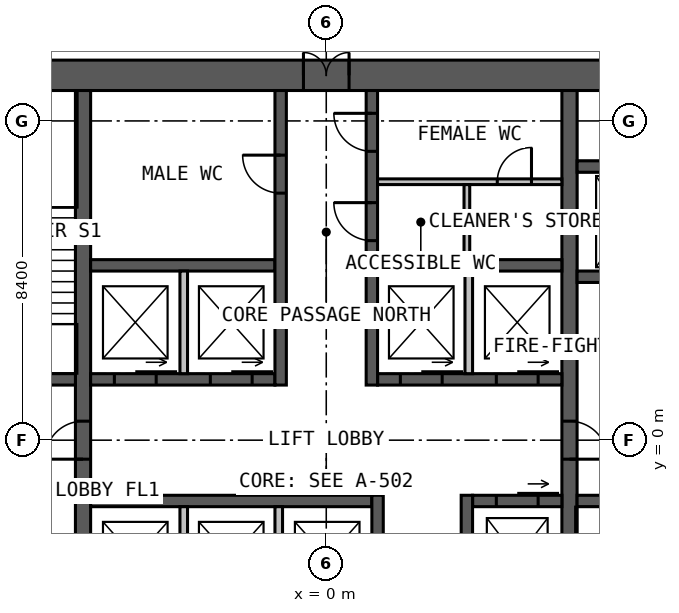
"""IFC4 building model, lengths in metres.
Left out: names, types, materials, properties, quantities, classifications, styles, units other than length and angle.
Written with IfcOpenShell. Run it as: python <this file> out.ifc"""

import sys

from ifc_helpers import new_model, si_unit, direction, frame, frame_2d, origin, place, context, subcontext, project, spatial, rectangle, extrude, element, fill, save


model = new_model("IFC4")
c1 = context("Model", 3, precision=1e-05, world=origin(), true_north=direction((0.0, 1.0)))
c2 = subcontext(c1, "Body", "Model", "MODEL_VIEW")
j1 = project(units=[si_unit("LENGTHUNIT", "METRE"), si_unit("PLANEANGLEUNIT", "RADIAN")], contexts=[c1])
p1 = place(None, origin())
s1 = spatial("IfcSite", under=j1, at=p1, CompositionType="ELEMENT")
p2 = place(p1, origin())
s2 = spatial("IfcBuilding", under=s1, at=p2, CompositionType="ELEMENT")
p3 = place(p2, frame((0.0, 0.0, 73.0)))
s3 = spatial("IfcBuildingStorey", under=s2, at=p3, CompositionType="ELEMENT", Elevation=73.0)
p4 = place(p3, frame((-10.0, 9.6, 0.0), z_axis=(0.0, 0.0, 1.0), x_axis=(1.0, 0.0, 0.0)))
e1 = element("IfcWall", 1, at=p4, inside=s3, PredefinedType="SOLIDWALL", context=c2, shape_type="SweptSolid", body=[
    extrude(rectangle(XDim=20.0, YDim=0.8, at=frame_2d((10.0, 0.0))), origin(), (0.0, 0.0, 1.0), 4.0),
])
p5 = place(p4, frame((9.4, 0.0, 0.0)))
e2 = element("IfcOpeningElement", 2, at=p5, cuts=e1, PredefinedType="OPENING", context=c2, shape_type="SweptSolid", body=[
    extrude(rectangle(XDim=1.2, YDim=2.2, at=frame_2d((0.6, 1.1))), frame((0.0, 0.41, 0.0), z_axis=(0.0, -1.0, 0.0), x_axis=(1.0, 0.0, 0.0)), (0.0, 0.0, 1.0), 0.82),
])
p6 = place(p3, frame((-6.4, -9.2, 0.0), z_axis=(0.0, 0.0, 1.0), x_axis=(0.0, 1.0, 0.0)))
e3 = element("IfcWall", 3, at=p6, inside=s3, PredefinedType="SOLIDWALL", context=c2, shape_type="SweptSolid", body=[
    extrude(rectangle(XDim=18.4, YDim=0.4, at=frame_2d((9.2, 0.0))), origin(), (0.0, 0.0, 1.0), 4.0),
])
p7 = place(p6, frame((8.7, 0.0, 0.0)))
e4 = element("IfcOpeningElement", 4, at=p7, cuts=e3, PredefinedType="OPENING", context=c2, shape_type="SweptSolid", body=[
    extrude(rectangle(XDim=1.0, YDim=2.2, at=frame_2d((0.5, 1.1))), frame((0.0, 0.21, 0.0), z_axis=(0.0, -1.0, 0.0), x_axis=(1.0, 0.0, 0.0)), (0.0, 0.0, 1.0), 0.42),
])
p8 = place(p3, frame((6.4, 9.2, 0.0), z_axis=(0.0, 0.0, 1.0), x_axis=(0.0, -1.0, 0.0)))
e5 = element("IfcWall", 5, at=p8, inside=s3, PredefinedType="SOLIDWALL", context=c2, shape_type="SweptSolid", body=[
    extrude(rectangle(XDim=18.4, YDim=0.4, at=frame_2d((9.2, 0.0))), origin(), (0.0, 0.0, 1.0), 4.0),
])
p9 = place(p8, frame((8.7, 0.0, 0.0)))
e6 = element("IfcOpeningElement", 6, at=p9, cuts=e5, PredefinedType="OPENING", context=c2, shape_type="SweptSolid", body=[
    extrude(rectangle(XDim=1.0, YDim=2.2, at=frame_2d((0.5, 1.1))), frame((0.0, 0.21, 0.0), z_axis=(0.0, -1.0, 0.0), x_axis=(1.0, 0.0, 0.0)), (0.0, 0.0, 1.0), 0.42),
])
p10 = place(p3, frame((-6.2, 1.6, 0.0), z_axis=(0.0, 0.0, 1.0), x_axis=(1.0, 0.0, 0.0)))
e7 = element("IfcWall", 7, at=p10, inside=s3, PredefinedType="SOLIDWALL", context=c2, shape_type="SweptSolid", body=[
    extrude(rectangle(XDim=4.85, YDim=0.3, at=frame_2d((2.425, 0.0))), origin(), (0.0, 0.0, 1.0), 4.0),
])
p11 = place(p10, frame((0.625, 0.0, 0.0)))
e8 = element("IfcOpeningElement", 8, at=p11, cuts=e7, PredefinedType="OPENING", context=c2, shape_type="SweptSolid", body=[
    extrude(rectangle(XDim=1.1, YDim=2.2, at=frame_2d((0.55, 1.1))), frame((0.0, 0.16, 0.0), z_axis=(0.0, -1.0, 0.0), x_axis=(1.0, 0.0, 0.0)), (0.0, 0.0, 1.0), 0.32),
])
p12 = place(p10, frame((3.15, 0.0, 0.0)))
e9 = element("IfcOpeningElement", 9, at=p12, cuts=e7, PredefinedType="OPENING", context=c2, shape_type="SweptSolid", body=[
    extrude(rectangle(XDim=1.1, YDim=2.2, at=frame_2d((0.55, 1.1))), frame((0.0, 0.16, 0.0), z_axis=(0.0, -1.0, 0.0), x_axis=(1.0, 0.0, 0.0)), (0.0, 0.0, 1.0), 0.32),
])
p13 = place(p3, frame((1.35, 1.6, 0.0), z_axis=(0.0, 0.0, 1.0), x_axis=(1.0, 0.0, 0.0)))
e10 = element("IfcWall", 10, at=p13, inside=s3, PredefinedType="SOLIDWALL", context=c2, shape_type="SweptSolid", body=[
    extrude(rectangle(XDim=4.85, YDim=0.3, at=frame_2d((2.425, 0.0))), origin(), (0.0, 0.0, 1.0), 4.0),
])
p14 = place(p13, frame((0.6, 0.0, 0.0)))
e11 = element("IfcOpeningElement", 11, at=p14, cuts=e10, PredefinedType="OPENING", context=c2, shape_type="SweptSolid", body=[
    extrude(rectangle(XDim=1.1, YDim=2.2, at=frame_2d((0.55, 1.1))), frame((0.0, 0.16, 0.0), z_axis=(0.0, -1.0, 0.0), x_axis=(1.0, 0.0, 0.0)), (0.0, 0.0, 1.0), 0.32),
])
p15 = place(p13, frame((3.125, 0.0, 0.0)))
e12 = element("IfcOpeningElement", 12, at=p15, cuts=e10, PredefinedType="OPENING", context=c2, shape_type="SweptSolid", body=[
    extrude(rectangle(XDim=1.1, YDim=2.2, at=frame_2d((0.55, 1.1))), frame((0.0, 0.16, 0.0), z_axis=(0.0, -1.0, 0.0), x_axis=(1.0, 0.0, 0.0)), (0.0, 0.0, 1.0), 0.32),
])
for number, where, z_axis, x_axis in (
    (13, (-6.2, 4.6, 0.0), (0.0, 0.0, 1.0), (1.0, 0.0, 0.0)),
    (14, (1.35, 4.6, 0.0), (0.0, 0.0, 1.0), (1.0, 0.0, 0.0)),
):
    element("IfcWall", number, at=place(p3, frame(where, z_axis=z_axis, x_axis=x_axis)), inside=s3, PredefinedType="SOLIDWALL", context=c2, shape_type="SweptSolid", body=[
        extrude(rectangle(XDim=4.85, YDim=0.3, at=frame_2d((2.425, 0.0))), origin(), (0.0, 0.0, 1.0), 4.0),
    ])
p16 = place(p3, frame((-1.2, 1.45, 0.0), z_axis=(0.0, 0.0, 1.0), x_axis=(0.0, 1.0, 0.0)))
e15 = element("IfcWall", 15, at=p16, inside=s3, PredefinedType="SOLIDWALL", context=c2, shape_type="SweptSolid", body=[
    extrude(rectangle(XDim=7.75, YDim=0.3, at=frame_2d((3.875, 0.0))), origin(), (0.0, 0.0, 1.0), 4.0),
])
p17 = place(p16, frame((5.05, 0.0, 0.0)))
e16 = element("IfcOpeningElement", 16, at=p17, cuts=e15, PredefinedType="OPENING", context=c2, shape_type="SweptSolid", body=[
    extrude(rectangle(XDim=1.0, YDim=2.2, at=frame_2d((0.5, 1.1))), frame((0.0, 0.16, 0.0), z_axis=(0.0, -1.0, 0.0), x_axis=(1.0, 0.0, 0.0)), (0.0, 0.0, 1.0), 0.32),
])
p18 = place(p3, frame((1.2, 1.45, 0.0), z_axis=(0.0, 0.0, 1.0), x_axis=(0.0, 1.0, 0.0)))
e17 = element("IfcWall", 17, at=p18, inside=s3, PredefinedType="SOLIDWALL", context=c2, shape_type="SweptSolid", body=[
    extrude(rectangle(XDim=7.75, YDim=0.3, at=frame_2d((3.875, 0.0))), origin(), (0.0, 0.0, 1.0), 4.0),
])
p19 = place(p18, frame((3.8, 0.0, 0.0)))
e18 = element("IfcOpeningElement", 18, at=p19, cuts=e17, PredefinedType="OPENING", context=c2, shape_type="SweptSolid", body=[
    extrude(rectangle(XDim=1.0, YDim=2.2, at=frame_2d((0.5, 1.1))), frame((0.0, 0.16, 0.0), z_axis=(0.0, -1.0, 0.0), x_axis=(1.0, 0.0, 0.0)), (0.0, 0.0, 1.0), 0.32),
])
p20 = place(p18, frame((6.15, 0.0, 0.0)))
e19 = element("IfcOpeningElement", 19, at=p20, cuts=e17, PredefinedType="OPENING", context=c2, shape_type="SweptSolid", body=[
    extrude(rectangle(XDim=1.0, YDim=2.2, at=frame_2d((0.5, 1.1))), frame((0.0, 0.16, 0.0), z_axis=(0.0, -1.0, 0.0), x_axis=(1.0, 0.0, 0.0)), (0.0, 0.0, 1.0), 0.32),
])
p21 = place(p3, frame((-6.2, -1.6, 0.0), z_axis=(0.0, 0.0, 1.0), x_axis=(1.0, 0.0, 0.0)))
e20 = element("IfcWall", 20, at=p21, inside=s3, PredefinedType="SOLIDWALL", context=c2, shape_type="SweptSolid", body=[
    extrude(rectangle(XDim=7.4, YDim=0.3, at=frame_2d((3.7, 0.0))), origin(), (0.0, 0.0, 1.0), 4.0),
])
p22 = place(p3, frame((3.85, -1.6, 0.0), z_axis=(0.0, 0.0, 1.0), x_axis=(1.0, 0.0, 0.0)))
e21 = element("IfcWall", 21, at=p22, inside=s3, PredefinedType="SOLIDWALL", context=c2, shape_type="SweptSolid", body=[
    extrude(rectangle(XDim=2.35, YDim=0.3, at=frame_2d((1.175, 0.0))), origin(), (0.0, 0.0, 1.0), 4.0),
])
p23 = place(p22, frame((0.625, 0.0, 0.0)))
e22 = element("IfcOpeningElement", 22, at=p23, cuts=e21, PredefinedType="OPENING", context=c2, shape_type="SweptSolid", body=[
    extrude(rectangle(XDim=1.1, YDim=2.2, at=frame_2d((0.55, 1.1))), frame((0.0, 0.16, 0.0), z_axis=(0.0, -1.0, 0.0), x_axis=(1.0, 0.0, 0.0)), (0.0, 0.0, 1.0), 0.32),
])
p24 = place(p3, frame((1.35, -1.45, 0.0), z_axis=(0.0, 0.0, 1.0), x_axis=(0.0, -1.0, 0.0)))
e23 = element("IfcWall", 23, at=p24, inside=s3, PredefinedType="SOLIDWALL", context=c2, shape_type="SweptSolid", body=[
    extrude(rectangle(XDim=7.75, YDim=0.3, at=frame_2d((3.875, 0.0))), origin(), (0.0, 0.0, 1.0), 4.0),
])
p25 = place(p24, frame((5.8, 0.0, 0.0)))
e24 = element("IfcOpeningElement", 24, at=p25, cuts=e23, PredefinedType="OPENING", context=c2, shape_type="SweptSolid", body=[
    extrude(rectangle(XDim=1.0, YDim=2.2, at=frame_2d((0.5, 1.1))), frame((0.0, 0.16, 0.0), z_axis=(0.0, -1.0, 0.0), x_axis=(1.0, 0.0, 0.0)), (0.0, 0.0, 1.0), 0.32),
])
p26 = place(p24, frame((3.525, 0.0, 0.0)))
e25 = element("IfcOpeningElement", 25, at=p26, cuts=e23, PredefinedType="OPENING", context=c2, shape_type="SweptSolid", body=[
    extrude(rectangle(XDim=0.9, YDim=2.2, at=frame_2d((0.45, 1.1))), frame((0.0, 0.16, 0.0), z_axis=(0.0, -1.0, 0.0), x_axis=(1.0, 0.0, 0.0)), (0.0, 0.0, 1.0), 0.32),
])
p27 = place(p3, frame((3.7, -1.45, 0.0), z_axis=(0.0, 0.0, 1.0), x_axis=(0.0, -1.0, 0.0)))
e26 = element("IfcWall", 26, at=p27, inside=s3, PredefinedType="SOLIDWALL", context=c2, shape_type="SweptSolid", body=[
    extrude(rectangle(XDim=7.75, YDim=0.3, at=frame_2d((3.875, 0.0))), origin(), (0.0, 0.0, 1.0), 4.0),
])
p28 = place(p27, frame((5.1, 0.0, 0.0)))
e27 = element("IfcOpeningElement", 27, at=p28, cuts=e26, PredefinedType="OPENING", context=c2, shape_type="SweptSolid", body=[
    extrude(rectangle(XDim=0.9, YDim=2.2, at=frame_2d((0.45, 1.1))), frame((0.0, 0.16, 0.0), z_axis=(0.0, -1.0, 0.0), x_axis=(1.0, 0.0, 0.0)), (0.0, 0.0, 1.0), 0.32),
])
p29 = place(p3, frame((-9.2, 1.6, 0.0), z_axis=(0.0, 0.0, 1.0), x_axis=(1.0, 0.0, 0.0)))
e28 = element("IfcWall", 28, at=p29, inside=s3, PredefinedType="SOLIDWALL", context=c2, shape_type="SweptSolid", body=[
    extrude(rectangle(XDim=2.6, YDim=0.3, at=frame_2d((1.3, 0.0))), origin(), (0.0, 0.0, 1.0), 4.0),
])
p30 = place(p29, frame((0.8, 0.0, 0.0)))
e29 = element("IfcOpeningElement", 29, at=p30, cuts=e28, PredefinedType="OPENING", context=c2, shape_type="SweptSolid", body=[
    extrude(rectangle(XDim=1.0, YDim=2.2, at=frame_2d((0.5, 1.1))), frame((0.0, 0.16, 0.0), z_axis=(0.0, -1.0, 0.0), x_axis=(1.0, 0.0, 0.0)), (0.0, 0.0, 1.0), 0.32),
])
p31 = place(p3, frame((6.6, -1.6, 0.0), z_axis=(0.0, 0.0, 1.0), x_axis=(1.0, 0.0, 0.0)))
e30 = element("IfcWall", 30, at=p31, inside=s3, PredefinedType="SOLIDWALL", context=c2, shape_type="SweptSolid", body=[
    extrude(rectangle(XDim=2.6, YDim=0.3, at=frame_2d((1.3, 0.0))), origin(), (0.0, 0.0, 1.0), 4.0),
])
p32 = place(p31, frame((0.8, 0.0, 0.0)))
e31 = element("IfcOpeningElement", 31, at=p32, cuts=e30, PredefinedType="OPENING", context=c2, shape_type="SweptSolid", body=[
    extrude(rectangle(XDim=1.0, YDim=2.2, at=frame_2d((0.5, 1.1))), frame((0.0, 0.16, 0.0), z_axis=(0.0, -1.0, 0.0), x_axis=(1.0, 0.0, 0.0)), (0.0, 0.0, 1.0), 0.32),
])
p33 = place(p3, frame((6.6, 4.3, 0.0), z_axis=(0.0, 0.0, 1.0), x_axis=(1.0, 0.0, 0.0)))
e32 = element("IfcWall", 32, at=p33, inside=s3, PredefinedType="SOLIDWALL", context=c2, shape_type="SweptSolid", body=[
    extrude(rectangle(XDim=2.6, YDim=0.3, at=frame_2d((1.3, 0.0))), origin(), (0.0, 0.0, 1.0), 4.0),
])
p34 = place(p33, frame((0.75, 0.0, 0.0)))
e33 = element("IfcOpeningElement", 33, at=p34, cuts=e32, PredefinedType="OPENING", context=c2, shape_type="SweptSolid", body=[
    extrude(rectangle(XDim=1.1, YDim=2.2, at=frame_2d((0.55, 1.1))), frame((0.0, 0.16, 0.0), z_axis=(0.0, -1.0, 0.0), x_axis=(1.0, 0.0, 0.0)), (0.0, 0.0, 1.0), 0.32),
])
p35 = place(p3, frame((6.6, 7.2, 0.0), z_axis=(0.0, 0.0, 1.0), x_axis=(1.0, 0.0, 0.0)))
e34 = element("IfcWall", 34, at=p35, inside=s3, PredefinedType="SOLIDWALL", context=c2, shape_type="SweptSolid", body=[
    extrude(rectangle(XDim=2.6, YDim=0.3, at=frame_2d((1.3, 0.0))), origin(), (0.0, 0.0, 1.0), 4.0),
])
for number, where, z_axis, x_axis in (
    (35, (-3.75, 1.75, 0.0), (0.0, 0.0, 1.0), (0.0, 1.0, 0.0)),
    (36, (3.75, 1.75, 0.0), (0.0, 0.0, 1.0), (0.0, 1.0, 0.0)),
    (37, (-3.75, -1.75, 0.0), (0.0, 0.0, 1.0), (0.0, -1.0, 0.0)),
    (38, (-1.25, -1.75, 0.0), (0.0, 0.0, 1.0), (0.0, -1.0, 0.0)),
):
    element("IfcWall", number, at=place(p3, frame(where, z_axis=z_axis, x_axis=x_axis)), inside=s3, PredefinedType="SOLIDWALL", context=c2, shape_type="SweptSolid", body=[
        extrude(rectangle(XDim=2.7, YDim=0.2, at=frame_2d((1.35, 0.0))), origin(), (0.0, 0.0, 1.0), 3.75),
    ])
p36 = place(p3, frame((1.35, 6.8, 0.0), z_axis=(0.0, 0.0, 1.0), x_axis=(1.0, 0.0, 0.0)))
e39 = element("IfcWall", 39, at=p36, inside=s3, PredefinedType="PARTITIONING", context=c2, shape_type="SweptSolid", body=[
    extrude(rectangle(XDim=4.85, YDim=0.15, at=frame_2d((2.425, 0.0))), origin(), (0.0, 0.0, 1.0), 3.75),
])
p37 = place(p36, frame((3.15, 0.0, 0.0)))
e40 = element("IfcOpeningElement", 40, at=p37, cuts=e39, PredefinedType="OPENING", context=c2, shape_type="SweptSolid", body=[
    extrude(rectangle(XDim=0.9, YDim=2.2, at=frame_2d((0.45, 1.1))), frame((0.0, 0.085, 0.0), z_axis=(0.0, -1.0, 0.0), x_axis=(1.0, 0.0, 0.0)), (0.0, 0.0, 1.0), 0.17),
])
p38 = place(p3, frame((3.7, 4.75, 0.0), z_axis=(0.0, 0.0, 1.0), x_axis=(0.0, 1.0, 0.0)))
e41 = element("IfcWall", 41, at=p38, inside=s3, PredefinedType="PARTITIONING", context=c2, shape_type="SweptSolid", body=[
    extrude(rectangle(XDim=1.975, YDim=0.15, at=frame_2d((0.988, 0.0))), origin(), (0.0, 0.0, 1.0), 3.75),
])
p39 = place(p5, origin())
e42 = element("IfcDoor", 42, at=p39, inside=s3, OperationType="DOUBLE_DOOR_SINGLE_SWING", PredefinedType="DOOR", context=c2, shape_type="SweptSolid", body=[
    extrude(rectangle(XDim=1.2, YDim=2.2, at=frame_2d((0.6, 1.1))), frame((0.0, 0.025, 0.0), z_axis=(0.0, -1.0, 0.0), x_axis=(1.0, 0.0, 0.0)), (0.0, 0.0, 1.0), 0.05),
])
fill(e2, e42)
p40 = place(p7, origin())
e43 = element("IfcDoor", 43, at=p40, inside=s3, OperationType="SINGLE_SWING_LEFT", PredefinedType="DOOR", context=c2, shape_type="SweptSolid", body=[
    extrude(rectangle(XDim=1.0, YDim=2.2, at=frame_2d((0.5, 1.1))), frame((0.0, 0.025, 0.0), z_axis=(0.0, -1.0, 0.0), x_axis=(1.0, 0.0, 0.0)), (0.0, 0.0, 1.0), 0.05),
])
fill(e4, e43)
p41 = place(p9, origin())
e44 = element("IfcDoor", 44, at=p41, inside=s3, OperationType="SINGLE_SWING_RIGHT", PredefinedType="DOOR", context=c2, shape_type="SweptSolid", body=[
    extrude(rectangle(XDim=1.0, YDim=2.2, at=frame_2d((0.5, 1.1))), frame((0.0, 0.025, 0.0), z_axis=(0.0, -1.0, 0.0), x_axis=(1.0, 0.0, 0.0)), (0.0, 0.0, 1.0), 0.05),
])
fill(e6, e44)
p42 = place(p17, origin())
e45 = element("IfcDoor", 45, at=p42, inside=s3, OperationType="SINGLE_SWING_RIGHT", PredefinedType="DOOR", context=c2, shape_type="SweptSolid", body=[
    extrude(rectangle(XDim=1.0, YDim=2.2, at=frame_2d((0.5, 1.1))), frame((0.0, 0.025, 0.0), z_axis=(0.0, -1.0, 0.0), x_axis=(1.0, 0.0, 0.0)), (0.0, 0.0, 1.0), 0.05),
])
fill(e16, e45)
p43 = place(p19, origin())
e46 = element("IfcDoor", 46, at=p43, inside=s3, OperationType="SINGLE_SWING_RIGHT", PredefinedType="DOOR", context=c2, shape_type="SweptSolid", body=[
    extrude(rectangle(XDim=1.0, YDim=2.2, at=frame_2d((0.5, 1.1))), frame((0.0, 0.025, 0.0), z_axis=(0.0, -1.0, 0.0), x_axis=(1.0, 0.0, 0.0)), (0.0, 0.0, 1.0), 0.05),
])
fill(e18, e46)
p44 = place(p20, origin())
e47 = element("IfcDoor", 47, at=p44, inside=s3, OperationType="SINGLE_SWING_RIGHT", PredefinedType="DOOR", context=c2, shape_type="SweptSolid", body=[
    extrude(rectangle(XDim=1.0, YDim=2.2, at=frame_2d((0.5, 1.1))), frame((0.0, 0.025, 0.0), z_axis=(0.0, -1.0, 0.0), x_axis=(1.0, 0.0, 0.0)), (0.0, 0.0, 1.0), 0.05),
])
fill(e19, e47)
p45 = place(p37, origin())
e48 = element("IfcDoor", 48, at=p45, inside=s3, OperationType="SINGLE_SWING_RIGHT", PredefinedType="DOOR", context=c2, shape_type="SweptSolid", body=[
    extrude(rectangle(XDim=0.9, YDim=2.2, at=frame_2d((0.45, 1.1))), frame((0.0, 0.025, 0.0), z_axis=(0.0, -1.0, 0.0), x_axis=(1.0, 0.0, 0.0)), (0.0, 0.0, 1.0), 0.05),
])
fill(e40, e48)
p46 = place(p11, origin())
e49 = element("IfcDoor", 49, at=p46, inside=s3, OperationType="SLIDING_TO_LEFT", PredefinedType="DOOR", context=c2, shape_type="SweptSolid", body=[
    extrude(rectangle(XDim=1.1, YDim=2.2, at=frame_2d((0.55, 1.1))), frame((0.0, 0.025, 0.0), z_axis=(0.0, -1.0, 0.0), x_axis=(1.0, 0.0, 0.0)), (0.0, 0.0, 1.0), 0.05),
])
fill(e8, e49)
p47 = place(p12, origin())
e50 = element("IfcDoor", 50, at=p47, inside=s3, OperationType="SLIDING_TO_LEFT", PredefinedType="DOOR", context=c2, shape_type="SweptSolid", body=[
    extrude(rectangle(XDim=1.1, YDim=2.2, at=frame_2d((0.55, 1.1))), frame((0.0, 0.025, 0.0), z_axis=(0.0, -1.0, 0.0), x_axis=(1.0, 0.0, 0.0)), (0.0, 0.0, 1.0), 0.05),
])
fill(e9, e50)
p48 = place(p14, origin())
e51 = element("IfcDoor", 51, at=p48, inside=s3, OperationType="SLIDING_TO_LEFT", PredefinedType="DOOR", context=c2, shape_type="SweptSolid", body=[
    extrude(rectangle(XDim=1.1, YDim=2.2, at=frame_2d((0.55, 1.1))), frame((0.0, 0.025, 0.0), z_axis=(0.0, -1.0, 0.0), x_axis=(1.0, 0.0, 0.0)), (0.0, 0.0, 1.0), 0.05),
])
fill(e11, e51)
p49 = place(p15, origin())
e52 = element("IfcDoor", 52, at=p49, inside=s3, OperationType="SLIDING_TO_LEFT", PredefinedType="DOOR", context=c2, shape_type="SweptSolid", body=[
    extrude(rectangle(XDim=1.1, YDim=2.2, at=frame_2d((0.55, 1.1))), frame((0.0, 0.025, 0.0), z_axis=(0.0, -1.0, 0.0), x_axis=(1.0, 0.0, 0.0)), (0.0, 0.0, 1.0), 0.05),
])
fill(e12, e52)
p50 = place(p23, origin())
e53 = element("IfcDoor", 53, at=p50, inside=s3, OperationType="SLIDING_TO_LEFT", PredefinedType="DOOR", context=c2, shape_type="SweptSolid", body=[
    extrude(rectangle(XDim=1.1, YDim=2.2, at=frame_2d((0.55, 1.1))), frame((0.0, 0.025, 0.0), z_axis=(0.0, -1.0, 0.0), x_axis=(1.0, 0.0, 0.0)), (0.0, 0.0, 1.0), 0.05),
])
fill(e22, e53)
save(model, sys.argv[1])
